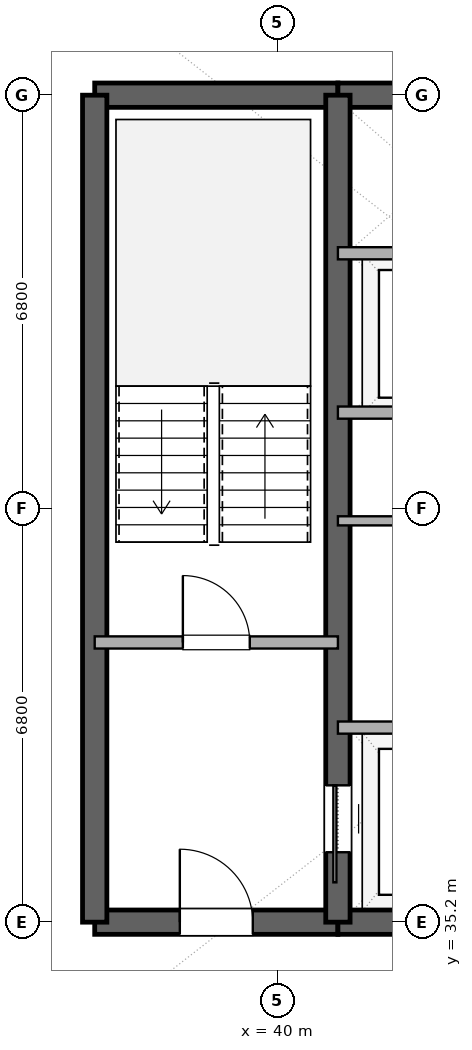
"""IFC4 building model, lengths in metres.
Left out: names, types, materials, properties, quantities, classifications, styles, units other than length and angle.
Written with IfcOpenShell. Run it as: python <this file> out.ifc"""

import sys

from ifc_helpers import new_model, si_unit, direction, frame, frame_2d, origin, place, context, subcontext, project, spatial, rectangle, extrude, element, fill, save


model = new_model("IFC4")
c1 = context("Model", 3, precision=1e-05, world=origin(), true_north=direction((0.0, 1.0)))
c2 = subcontext(c1, "Body", "Model", "MODEL_VIEW")
j1 = project(units=[si_unit("LENGTHUNIT", "METRE"), si_unit("PLANEANGLEUNIT", "RADIAN")], contexts=[c1])
p1 = place(None, origin())
s1 = spatial("IfcSite", under=j1, at=p1, CompositionType="ELEMENT")
p2 = place(p1, origin())
s2 = spatial("IfcBuilding", under=s1, at=p2, CompositionType="ELEMENT")
p3 = place(p2, frame((0.0, 0.0, 242.4)))
s3 = spatial("IfcBuildingStorey", under=s2, at=p3, CompositionType="ELEMENT", Elevation=242.4)
p4 = place(p3, frame((37.0, 35.2, 0.0), z_axis=(0.0, 0.0, 1.0), x_axis=(1.0, 0.0, 0.0)))
e1 = element("IfcWall", 1, at=p4, inside=s3, PredefinedType="SHEAR", context=c2, shape_type="SweptSolid", body=[
    extrude(rectangle(XDim=4.0, YDim=0.4, at=frame_2d((2.0, 0.0))), origin(), (0.0, 0.0, 1.0), 3.36),
])
p5 = place(p4, frame((1.4, 0.0, 0.0)))
e2 = element("IfcOpeningElement", 2, at=p5, cuts=e1, PredefinedType="OPENING", context=c2, shape_type="SweptSolid", body=[
    extrude(rectangle(XDim=1.2, YDim=2.15, at=frame_2d((0.6, 1.075))), frame((0.0, 0.21, 0.0), z_axis=(0.0, -1.0, 0.0), x_axis=(1.0, 0.0, 0.0)), (0.0, 0.0, 1.0), 0.42),
])
p6 = place(p3, frame((41.0, 35.2, 0.0), z_axis=(0.0, 0.0, 1.0), x_axis=(1.0, 0.0, 0.0)))
e3 = element("IfcWall", 3, at=p6, inside=s3, PredefinedType="SHEAR", context=c2, shape_type="SweptSolid", body=[
    extrude(rectangle(XDim=14.0, YDim=0.4, at=frame_2d((7.0, 0.0))), origin(), (0.0, 0.0, 1.0), 3.36),
])
p7 = place(p6, frame((6.1, 0.0, 0.0)))
e4 = element("IfcOpeningElement", 4, at=p7, cuts=e3, PredefinedType="OPENING", context=c2, shape_type="SweptSolid", body=[
    extrude(rectangle(XDim=1.8, YDim=2.25, at=frame_2d((0.9, 1.125))), frame((0.0, 0.21, 0.0), z_axis=(0.0, -1.0, 0.0), x_axis=(1.0, 0.0, 0.0)), (0.0, 0.0, 1.0), 0.42),
])
p8 = place(p3, frame((37.0, 48.8, 0.0), z_axis=(0.0, 0.0, 1.0), x_axis=(1.0, 0.0, 0.0)))
e5 = element("IfcWall", 5, at=p8, inside=s3, PredefinedType="SHEAR", context=c2, shape_type="SweptSolid", body=[
    extrude(rectangle(XDim=4.0, YDim=0.4, at=frame_2d((2.0, 0.0))), origin(), (0.0, 0.0, 1.0), 3.36),
])
p9 = place(p3, frame((41.0, 48.8, 0.0), z_axis=(0.0, 0.0, 1.0), x_axis=(1.0, 0.0, 0.0)))
e6 = element("IfcWall", 6, at=p9, inside=s3, PredefinedType="SHEAR", context=c2, shape_type="SweptSolid", body=[
    extrude(rectangle(XDim=14.0, YDim=0.4, at=frame_2d((7.0, 0.0))), origin(), (0.0, 0.0, 1.0), 3.36),
])
p10 = place(p9, frame((6.1, 0.0, 0.0)))
e7 = element("IfcOpeningElement", 7, at=p10, cuts=e6, PredefinedType="OPENING", context=c2, shape_type="SweptSolid", body=[
    extrude(rectangle(XDim=1.8, YDim=2.25, at=frame_2d((0.9, 1.125))), frame((0.0, 0.21, 0.0), z_axis=(0.0, -1.0, 0.0), x_axis=(1.0, 0.0, 0.0)), (0.0, 0.0, 1.0), 0.42),
])
p11 = place(p3, frame((37.0, 35.2, 0.0), z_axis=(0.0, 0.0, 1.0), x_axis=(0.0, 1.0, 0.0)))
e8 = element("IfcWall", 8, at=p11, inside=s3, PredefinedType="SHEAR", context=c2, shape_type="SweptSolid", body=[
    extrude(rectangle(XDim=13.6, YDim=0.4, at=frame_2d((6.8, 0.0))), origin(), (0.0, 0.0, 1.0), 3.36),
])
p12 = place(p3, frame((41.0, 35.2, 0.0), z_axis=(0.0, 0.0, 1.0), x_axis=(0.0, 1.0, 0.0)))
e9 = element("IfcWall", 9, at=p12, inside=s3, PredefinedType="SHEAR", context=c2, shape_type="SweptSolid", body=[
    extrude(rectangle(XDim=13.6, YDim=0.4, at=frame_2d((6.8, 0.0))), origin(), (0.0, 0.0, 1.0), 3.36),
])
p13 = place(p12, frame((1.15, 0.0, 0.0)))
e10 = element("IfcOpeningElement", 10, at=p13, cuts=e9, PredefinedType="OPENING", context=c2, shape_type="SweptSolid", body=[
    extrude(rectangle(XDim=1.1, YDim=2.2, at=frame_2d((0.55, 1.1))), frame((0.0, 0.21, 0.0), z_axis=(0.0, -1.0, 0.0), x_axis=(1.0, 0.0, 0.0)), (0.0, 0.0, 1.0), 0.42),
])
p14 = place(p3, frame((37.0, 39.8, 0.0), z_axis=(0.0, 0.0, 1.0), x_axis=(1.0, 0.0, 0.0)))
e11 = element("IfcWall", 11, at=p14, inside=s3, PredefinedType="SOLIDWALL", context=c2, shape_type="SweptSolid", body=[
    extrude(rectangle(XDim=4.0, YDim=0.2, at=frame_2d((2.0, 0.0))), origin(), (0.0, 0.0, 1.0), 2.72),
])
p15 = place(p14, frame((1.45, 0.0, 0.0)))
e12 = element("IfcOpeningElement", 12, at=p15, cuts=e11, PredefinedType="OPENING", context=c2, shape_type="SweptSolid", body=[
    extrude(rectangle(XDim=1.1, YDim=2.15, at=frame_2d((0.55, 1.075))), frame((0.0, 0.11, 0.0), z_axis=(0.0, -1.0, 0.0), x_axis=(1.0, 0.0, 0.0)), (0.0, 0.0, 1.0), 0.22),
])
for number, where, z_axis, x_axis in (
    (13, (41.0, 38.4, 0.0), (0.0, 0.0, 1.0), (1.0, 0.0, 0.0)),
    (14, (41.0, 46.2, 0.0), (0.0, 0.0, 1.0), (1.0, 0.0, 0.0)),
    (15, (41.0, 43.58, 0.0), (0.0, 0.0, 1.0), (1.0, 0.0, 0.0)),
):
    element("IfcWall", number, at=place(p3, frame(where, z_axis=z_axis, x_axis=x_axis)), inside=s3, PredefinedType="SOLIDWALL", context=c2, shape_type="SweptSolid", body=[
        extrude(rectangle(XDim=2.95, YDim=0.2, at=frame_2d((1.475, 0.0))), origin(), (0.0, 0.0, 1.0), 2.72),
    ])
p16 = place(p3, frame((41.0, 41.8, 0.0), z_axis=(0.0, 0.0, 1.0), x_axis=(1.0, 0.0, 0.0)))
e16 = element("IfcWall", 16, at=p16, inside=s3, PredefinedType="PARTITIONING", context=c2, shape_type="SweptSolid", body=[
    extrude(rectangle(XDim=4.6, YDim=0.15, at=frame_2d((2.3, 0.0))), origin(), (0.0, 0.0, 1.0), 2.72),
])
p17 = place(p13, origin())
e17 = element("IfcDoor", 17, at=p17, inside=s3, OperationType="SLIDING_TO_LEFT", PredefinedType="DOOR", context=c2, shape_type="SweptSolid", body=[
    extrude(rectangle(XDim=1.1, YDim=2.2, at=frame_2d((0.55, 1.1))), frame((0.0, 0.025, 0.0), z_axis=(0.0, -1.0, 0.0), x_axis=(1.0, 0.0, 0.0)), (0.0, 0.0, 1.0), 0.05),
])
fill(e10, e17)
p18 = place(p5, origin())
e18 = element("IfcDoor", 18, at=p18, inside=s3, OperationType="SINGLE_SWING_LEFT", PredefinedType="DOOR", context=c2, shape_type="SweptSolid", body=[
    extrude(rectangle(XDim=1.2, YDim=2.15, at=frame_2d((0.6, 1.075))), frame((0.0, 0.025, 0.0), z_axis=(0.0, -1.0, 0.0), x_axis=(1.0, 0.0, 0.0)), (0.0, 0.0, 1.0), 0.05),
])
fill(e2, e18)
p19 = place(p15, origin())
e19 = element("IfcDoor", 19, at=p19, inside=s3, OperationType="SINGLE_SWING_LEFT", PredefinedType="DOOR", context=c2, shape_type="SweptSolid", body=[
    extrude(rectangle(XDim=1.1, YDim=2.15, at=frame_2d((0.55, 1.075))), frame((0.0, 0.025, 0.0), z_axis=(0.0, -1.0, 0.0), x_axis=(1.0, 0.0, 0.0)), (0.0, 0.0, 1.0), 0.05),
])
fill(e12, e19)
save(model, sys.argv[1])
